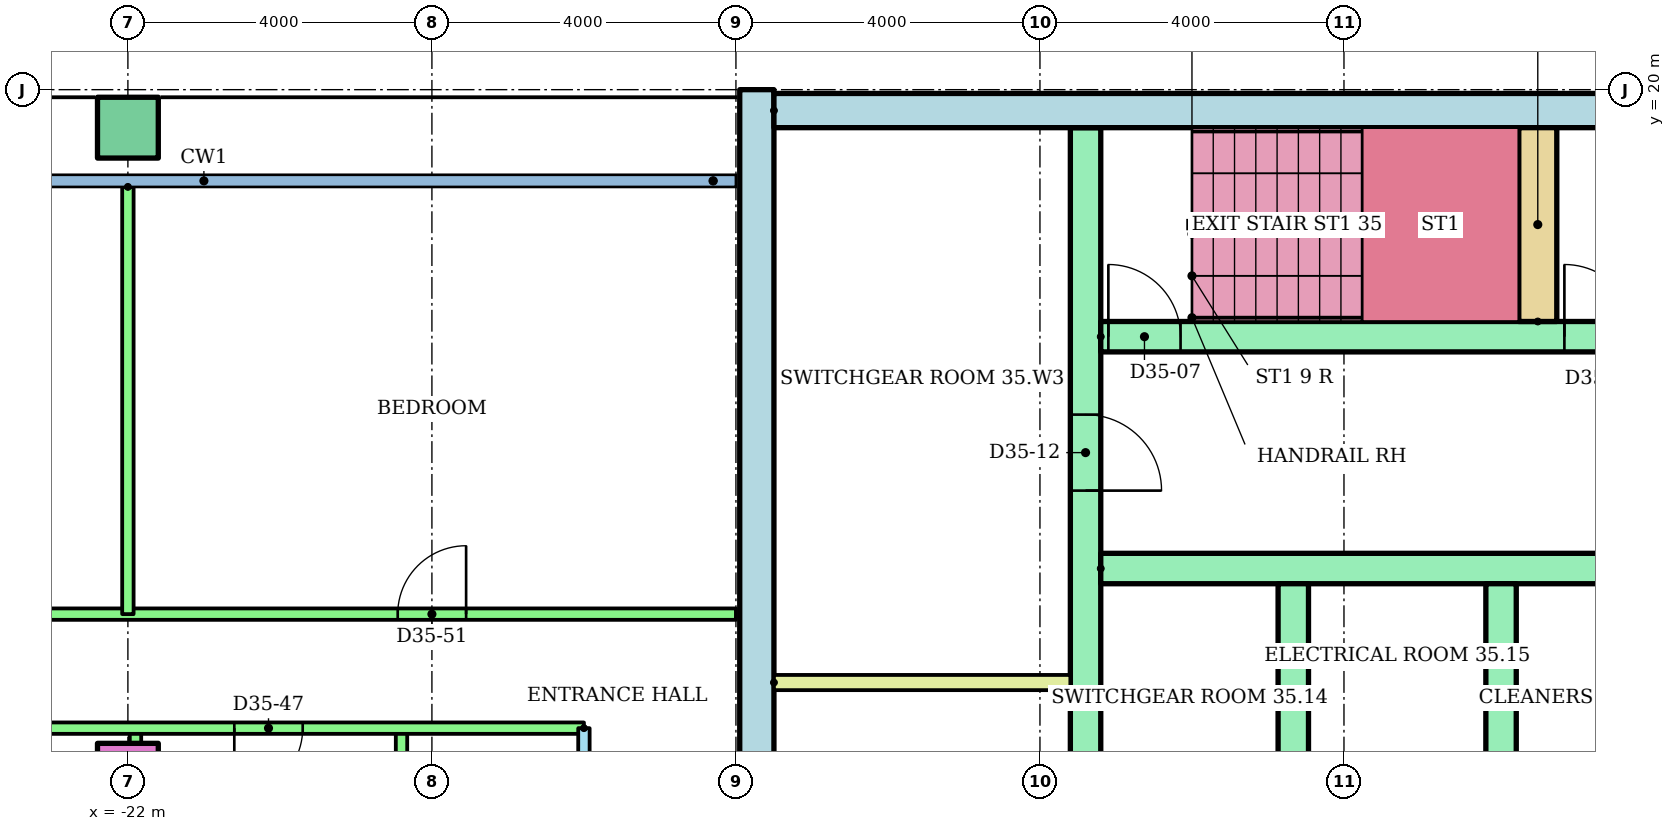
"""IFC4 building model, lengths in metres.
Left out: names, types, materials, properties, quantities, classifications, styles, units other than length and angle.
Written with IfcOpenShell. Run it as: python <this file> out.ifc"""

import sys

from ifc_helpers import new_model, si_unit, direction, frame, frame_2d, origin, origin_2d, place, context, subcontext, project, spatial, rectangle, hollow_rectangle, extrude, element, fill, save


model = new_model("IFC4")
c1 = context("Model", 3, precision=1e-05, world=origin(), true_north=direction((0.0, 1.0)))
c2 = subcontext(c1, "Body", "Model", "MODEL_VIEW")
j1 = project(units=[si_unit("LENGTHUNIT", "METRE"), si_unit("PLANEANGLEUNIT", "RADIAN")], contexts=[c1])
p1 = place(None, origin())
s1 = spatial("IfcSite", under=j1, at=p1, CompositionType="ELEMENT")
p2 = place(p1, origin())
s2 = spatial("IfcBuilding", under=s1, at=p2, CompositionType="ELEMENT")
p3 = place(p2, frame((0.0, 0.0, 135.8)))
s3 = spatial("IfcBuildingStorey", under=s2, at=p3, CompositionType="ELEMENT", Elevation=135.8)
p4 = place(p3, frame((-22.0, 11.0, 0.0)))
e1 = element("IfcColumn", 1, at=p4, inside=s3, PredefinedType="COLUMN", context=c2, shape_type="SweptSolid", body=[
    extrude(rectangle(XDim=0.8, YDim=0.8, at=origin_2d()), origin(), (0.0, 0.0, 1.0), 3.2),
])
p5 = place(p3, frame((-22.0, 19.5, 0.0)))
e2 = element("IfcColumn", 2, at=p5, inside=s3, PredefinedType="COLUMN", context=c2, shape_type="SweptSolid", body=[
    extrude(hollow_rectangle(XDim=0.8, YDim=0.8, WallThickness=0.04, at=origin_2d()), origin(), (0.0, 0.0, 1.0), 3.2),
])
p6 = place(p3, frame((-13.725, 3.0, 0.0), z_axis=(0.0, 0.0, 1.0), x_axis=(0.0, 1.0, 0.0)))
e3 = element("IfcWall", 3, at=p6, inside=s3, PredefinedType="SHEAR", context=c2, shape_type="SweptSolid", body=[
    extrude(rectangle(XDim=17.0, YDim=0.45, at=frame_2d((8.5, 0.0))), origin(), (0.0, 0.0, 1.0), 2.92),
])
p7 = place(p3, frame((-13.5, 19.725, 0.0)))
e4 = element("IfcWall", 4, at=p7, inside=s3, PredefinedType="SHEAR", context=c2, shape_type="SweptSolid", body=[
    extrude(rectangle(XDim=27.0, YDim=0.45, at=frame_2d((13.5, 0.0))), origin(), (0.0, 0.0, 1.0), 2.92),
])
p8 = place(p3, frame((-9.4, 6.8, 0.0), z_axis=(0.0, 0.0, 1.0), x_axis=(0.0, 1.0, 0.0)))
e5 = element("IfcWall", 5, at=p8, inside=s3, PredefinedType="SHEAR", context=c2, shape_type="SweptSolid", body=[
    extrude(rectangle(XDim=12.7, YDim=0.4, at=frame_2d((6.35, 0.0))), origin(), (0.0, 0.0, 1.0), 2.92),
])
p9 = place(p8, frame((0.3, 0.0, 0.0)))
e6 = element("IfcOpeningElement", 6, at=p9, cuts=e5, PredefinedType="OPENING", context=c2, shape_type="SweptSolid", body=[
    extrude(rectangle(XDim=1.0, YDim=2.1, at=frame_2d((0.5, 1.05))), frame((0.0, 0.21, 0.0), z_axis=(0.0, -1.0, 0.0), x_axis=(1.0, 0.0, 0.0)), (0.0, 0.0, 1.0), 0.42),
])
p10 = place(p8, frame((2.05, 0.0, 0.0)))
e7 = element("IfcOpeningElement", 7, at=p10, cuts=e5, PredefinedType="OPENING", context=c2, shape_type="SweptSolid", body=[
    extrude(rectangle(XDim=1.0, YDim=2.1, at=frame_2d((0.5, 1.05))), frame((0.0, 0.21, 0.0), z_axis=(0.0, -1.0, 0.0), x_axis=(1.0, 0.0, 0.0)), (0.0, 0.0, 1.0), 0.42),
])
p11 = place(p8, frame((7.925, 0.0, 0.0)))
e8 = element("IfcOpeningElement", 8, at=p11, cuts=e5, PredefinedType="OPENING", context=c2, shape_type="SweptSolid", body=[
    extrude(rectangle(XDim=1.0, YDim=2.1, at=frame_2d((0.5, 1.05))), frame((0.0, 0.21, 0.0), z_axis=(0.0, -1.0, 0.0), x_axis=(1.0, 0.0, 0.0)), (0.0, 0.0, 1.0), 0.42),
])
p12 = place(p3, frame((-9.2, 13.7, 0.0)))
e9 = element("IfcWall", 9, at=p12, inside=s3, PredefinedType="SHEAR", context=c2, shape_type="SweptSolid", body=[
    extrude(rectangle(XDim=8.0, YDim=0.4, at=frame_2d((4.0, 0.0))), origin(), (0.0, 0.0, 1.0), 2.92),
])
for number, where, z_axis, x_axis in (
    (10, (-6.667, 10.5, 0.0), (0.0, 0.0, 1.0), (0.0, 1.0, 0.0)),
    (11, (-3.933, 10.5, 0.0), (0.0, 0.0, 1.0), (0.0, 1.0, 0.0)),
):
    element("IfcWall", number, at=place(p3, frame(where, z_axis=z_axis, x_axis=x_axis)), inside=s3, PredefinedType="SHEAR", context=c2, shape_type="SweptSolid", body=[
        extrude(rectangle(XDim=3.0, YDim=0.4, at=frame_2d((1.5, 0.0))), origin(), (0.0, 0.0, 1.0), 2.92),
    ])
p13 = place(p3, frame((-9.2, 16.75, 0.0)))
e12 = element("IfcWall", 12, at=p13, inside=s3, PredefinedType="SHEAR", context=c2, shape_type="SweptSolid", body=[
    extrude(rectangle(XDim=18.4, YDim=0.4, at=frame_2d((9.2, 0.0))), origin(), (0.0, 0.0, 1.0), 2.92),
])
p14 = place(p13, frame((0.1, 0.0, 0.0)))
e13 = element("IfcOpeningElement", 13, at=p14, cuts=e12, PredefinedType="OPENING", context=c2, shape_type="SweptSolid", body=[
    extrude(rectangle(XDim=0.95, YDim=2.1, at=frame_2d((0.475, 1.05))), frame((0.0, 0.21, 0.0), z_axis=(0.0, -1.0, 0.0), x_axis=(1.0, 0.0, 0.0)), (0.0, 0.0, 1.0), 0.42),
])
p15 = place(p13, frame((6.1, 0.0, 0.0)))
e14 = element("IfcOpeningElement", 14, at=p15, cuts=e12, PredefinedType="OPENING", context=c2, shape_type="SweptSolid", body=[
    extrude(rectangle(XDim=0.95, YDim=2.1, at=frame_2d((0.475, 1.05))), frame((0.0, 0.21, 0.0), z_axis=(0.0, -1.0, 0.0), x_axis=(1.0, 0.0, 0.0)), (0.0, 0.0, 1.0), 0.42),
])
p16 = place(p13, frame((12.1, 0.0, 0.0)))
e15 = element("IfcOpeningElement", 15, at=p16, cuts=e12, PredefinedType="OPENING", context=c2, shape_type="SweptSolid", body=[
    extrude(rectangle(XDim=0.95, YDim=2.1, at=frame_2d((0.475, 1.05))), frame((0.0, 0.21, 0.0), z_axis=(0.0, -1.0, 0.0), x_axis=(1.0, 0.0, 0.0)), (0.0, 0.0, 1.0), 0.42),
])
p17 = place(p3, frame((-3.45, 16.95, 0.0), z_axis=(0.0, 0.0, 1.0), x_axis=(0.0, 1.0, 0.0)))
e16 = element("IfcWall", 16, at=p17, inside=s3, PredefinedType="SHEAR", context=c2, shape_type="SweptSolid", body=[
    extrude(rectangle(XDim=2.55, YDim=0.5, at=frame_2d((1.275, 0.0))), origin(), (0.0, 0.0, 1.0), 2.92),
])
p18 = place(p3, frame((-13.5, 12.2, 0.0)))
e17 = element("IfcWall", 17, at=p18, inside=s3, PredefinedType="PARTITIONING", context=c2, shape_type="SweptSolid", body=[
    extrude(rectangle(XDim=3.9, YDim=0.2, at=frame_2d((1.95, 0.0))), origin(), (0.0, 0.0, 1.0), 2.92),
])
p19 = place(p3, frame((-16.0, 1.4, 0.0), z_axis=(0.0, 0.0, 1.0), x_axis=(0.0, 1.0, 0.0)))
e18 = element("IfcWall", 18, at=p19, inside=s3, PredefinedType="PARTITIONING", context=c2, shape_type="SweptSolid", body=[
    extrude(rectangle(XDim=10.2, YDim=0.15, at=frame_2d((5.1, 0.0))), origin(), (0.0, 0.0, 1.0), 2.4),
])
p20 = place(p19, frame((2.3, 0.0, 0.0)))
e19 = element("IfcOpeningElement", 19, at=p20, cuts=e18, PredefinedType="OPENING", context=c2, shape_type="SweptSolid", body=[
    extrude(rectangle(XDim=0.9, YDim=2.1, at=frame_2d((0.45, 1.05))), frame((0.0, 0.085, 0.0), z_axis=(0.0, -1.0, 0.0), x_axis=(1.0, 0.0, 0.0)), (0.0, 0.0, 1.0), 0.17),
])
p21 = place(p19, frame((7.45, 0.0, 0.0)))
e20 = element("IfcOpeningElement", 20, at=p21, cuts=e18, PredefinedType="OPENING", context=c2, shape_type="SweptSolid", body=[
    extrude(rectangle(XDim=0.8, YDim=2.1, at=frame_2d((0.4, 1.05))), frame((0.0, 0.085, 0.0), z_axis=(0.0, -1.0, 0.0), x_axis=(1.0, 0.0, 0.0)), (0.0, 0.0, 1.0), 0.17),
])
for number, where, z_axis, x_axis in (
    (21, (-18.4, 1.4, 0.0), (0.0, 0.0, 1.0), (0.0, 1.0, 0.0)),
    (22, (-21.9, 1.4, 0.0), (0.0, 0.0, 1.0), (0.0, 1.0, 0.0)),
):
    element("IfcWall", number, at=place(p3, frame(where, z_axis=z_axis, x_axis=x_axis)), inside=s3, PredefinedType="PARTITIONING", context=c2, shape_type="SweptSolid", body=[
        extrude(rectangle(XDim=10.2, YDim=0.15, at=frame_2d((5.1, 0.0))), origin(), (0.0, 0.0, 1.0), 2.4),
    ])
p22 = place(p3, frame((-16.0, 11.6, 0.0), z_axis=(0.0, 0.0, 1.0), x_axis=(-1.0, 0.0, 0.0)))
e23 = element("IfcWall", 23, at=p22, inside=s3, PredefinedType="PARTITIONING", context=c2, shape_type="SweptSolid", body=[
    extrude(rectangle(XDim=16.72, YDim=0.15, at=frame_2d((8.36, 0.0))), origin(), (0.0, 0.0, 1.0), 2.4),
])
p23 = place(p22, frame((3.7, 0.0, 0.0)))
e24 = element("IfcOpeningElement", 24, at=p23, cuts=e23, PredefinedType="OPENING", context=c2, shape_type="SweptSolid", body=[
    extrude(rectangle(XDim=0.9, YDim=2.1, at=frame_2d((0.45, 1.05))), frame((0.0, 0.085, 0.0), z_axis=(0.0, -1.0, 0.0), x_axis=(1.0, 0.0, 0.0)), (0.0, 0.0, 1.0), 0.17),
])
p24 = place(p22, frame((7.825, 0.0, 0.0)))
e25 = element("IfcOpeningElement", 25, at=p24, cuts=e23, PredefinedType="OPENING", context=c2, shape_type="SweptSolid", body=[
    extrude(rectangle(XDim=0.9, YDim=2.1, at=frame_2d((0.45, 1.05))), frame((0.0, 0.085, 0.0), z_axis=(0.0, -1.0, 0.0), x_axis=(1.0, 0.0, 0.0)), (0.0, 0.0, 1.0), 0.17),
])
p25 = place(p22, frame((12.482, 0.0, 0.0)))
e26 = element("IfcOpeningElement", 26, at=p25, cuts=e23, PredefinedType="OPENING", context=c2, shape_type="SweptSolid", body=[
    extrude(rectangle(XDim=0.9, YDim=2.1, at=frame_2d((0.45, 1.05))), frame((0.0, 0.085, 0.0), z_axis=(0.0, -1.0, 0.0), x_axis=(1.0, 0.0, 0.0)), (0.0, 0.0, 1.0), 0.17),
])
p26 = place(p3, frame((-32.72, 13.1, 0.0)))
e27 = element("IfcWall", 27, at=p26, inside=s3, PredefinedType="PARTITIONING", context=c2, shape_type="SweptSolid", body=[
    extrude(rectangle(XDim=18.72, YDim=0.15, at=frame_2d((9.36, 0.0))), origin(), (0.0, 0.0, 1.0), 2.4),
])
p27 = place(p26, frame((4.97, 0.0, 0.0)))
e28 = element("IfcOpeningElement", 28, at=p27, cuts=e27, PredefinedType="OPENING", context=c2, shape_type="SweptSolid", body=[
    extrude(rectangle(XDim=1.0, YDim=2.1, at=frame_2d((0.5, 1.05))), frame((0.0, 0.085, 0.0), z_axis=(0.0, -1.0, 0.0), x_axis=(1.0, 0.0, 0.0)), (0.0, 0.0, 1.0), 0.17),
])
p28 = place(p26, frame((14.27, 0.0, 0.0)))
e29 = element("IfcOpeningElement", 29, at=p28, cuts=e27, PredefinedType="OPENING", context=c2, shape_type="SweptSolid", body=[
    extrude(rectangle(XDim=0.9, YDim=2.1, at=frame_2d((0.45, 1.05))), frame((0.0, 0.085, 0.0), z_axis=(0.0, -1.0, 0.0), x_axis=(1.0, 0.0, 0.0)), (0.0, 0.0, 1.0), 0.17),
])
p29 = place(p3, frame((-22.0, 18.721, 0.0), z_axis=(0.0, 0.0, 1.0), x_axis=(0.0, -1.0, 0.0)))
e30 = element("IfcWall", 30, at=p29, inside=s3, PredefinedType="PARTITIONING", context=c2, shape_type="SweptSolid", body=[
    extrude(rectangle(XDim=5.621, YDim=0.15, at=frame_2d((2.811, 0.0))), origin(), (0.0, 0.0, 1.0), 2.4),
])
p30 = place(p14, origin())
e31 = element("IfcDoor", 31, at=p30, inside=s3, OperationType="SINGLE_SWING_LEFT", PredefinedType="DOOR", context=c2, shape_type="SweptSolid", body=[
    extrude(rectangle(XDim=0.95, YDim=2.1, at=frame_2d((0.475, 1.05))), frame((0.0, 0.025, 0.0), z_axis=(0.0, -1.0, 0.0), x_axis=(1.0, 0.0, 0.0)), (0.0, 0.0, 1.0), 0.05),
])
fill(e13, e31)
p31 = place(p15, origin())
e32 = element("IfcDoor", 32, at=p31, inside=s3, OperationType="SINGLE_SWING_LEFT", PredefinedType="DOOR", context=c2, shape_type="SweptSolid", body=[
    extrude(rectangle(XDim=0.95, YDim=2.1, at=frame_2d((0.475, 1.05))), frame((0.0, 0.025, 0.0), z_axis=(0.0, -1.0, 0.0), x_axis=(1.0, 0.0, 0.0)), (0.0, 0.0, 1.0), 0.05),
])
fill(e14, e32)
p32 = place(p11, frame((1.0, 0.0, 0.0), z_axis=(0.0, 0.0, 1.0), x_axis=(-1.0, 0.0, 0.0)))
e33 = element("IfcDoor", 33, at=p32, inside=s3, OperationType="SINGLE_SWING_LEFT", PredefinedType="DOOR", context=c2, shape_type="SweptSolid", body=[
    extrude(rectangle(XDim=1.0, YDim=2.1, at=frame_2d((0.5, 1.05))), frame((0.0, 0.025, 0.0), z_axis=(0.0, -1.0, 0.0), x_axis=(1.0, 0.0, 0.0)), (0.0, 0.0, 1.0), 0.05),
])
fill(e8, e33)
p33 = place(p23, origin())
e34 = element("IfcDoor", 34, at=p33, inside=s3, OperationType="SINGLE_SWING_RIGHT", PredefinedType="DOOR", context=c2, shape_type="SweptSolid", body=[
    extrude(rectangle(XDim=0.9, YDim=2.1, at=frame_2d((0.45, 1.05))), frame((0.0, 0.025, 0.0), z_axis=(0.0, -1.0, 0.0), x_axis=(1.0, 0.0, 0.0)), (0.0, 0.0, 1.0), 0.05),
])
fill(e24, e34)
p34 = place(p28, origin())
e35 = element("IfcDoor", 35, at=p34, inside=s3, OperationType="SINGLE_SWING_RIGHT", PredefinedType="DOOR", context=c2, shape_type="SweptSolid", body=[
    extrude(rectangle(XDim=0.9, YDim=2.1, at=frame_2d((0.45, 1.05))), frame((0.0, 0.025, 0.0), z_axis=(0.0, -1.0, 0.0), x_axis=(1.0, 0.0, 0.0)), (0.0, 0.0, 1.0), 0.05),
])
fill(e29, e35)
save(model, sys.argv[1])
